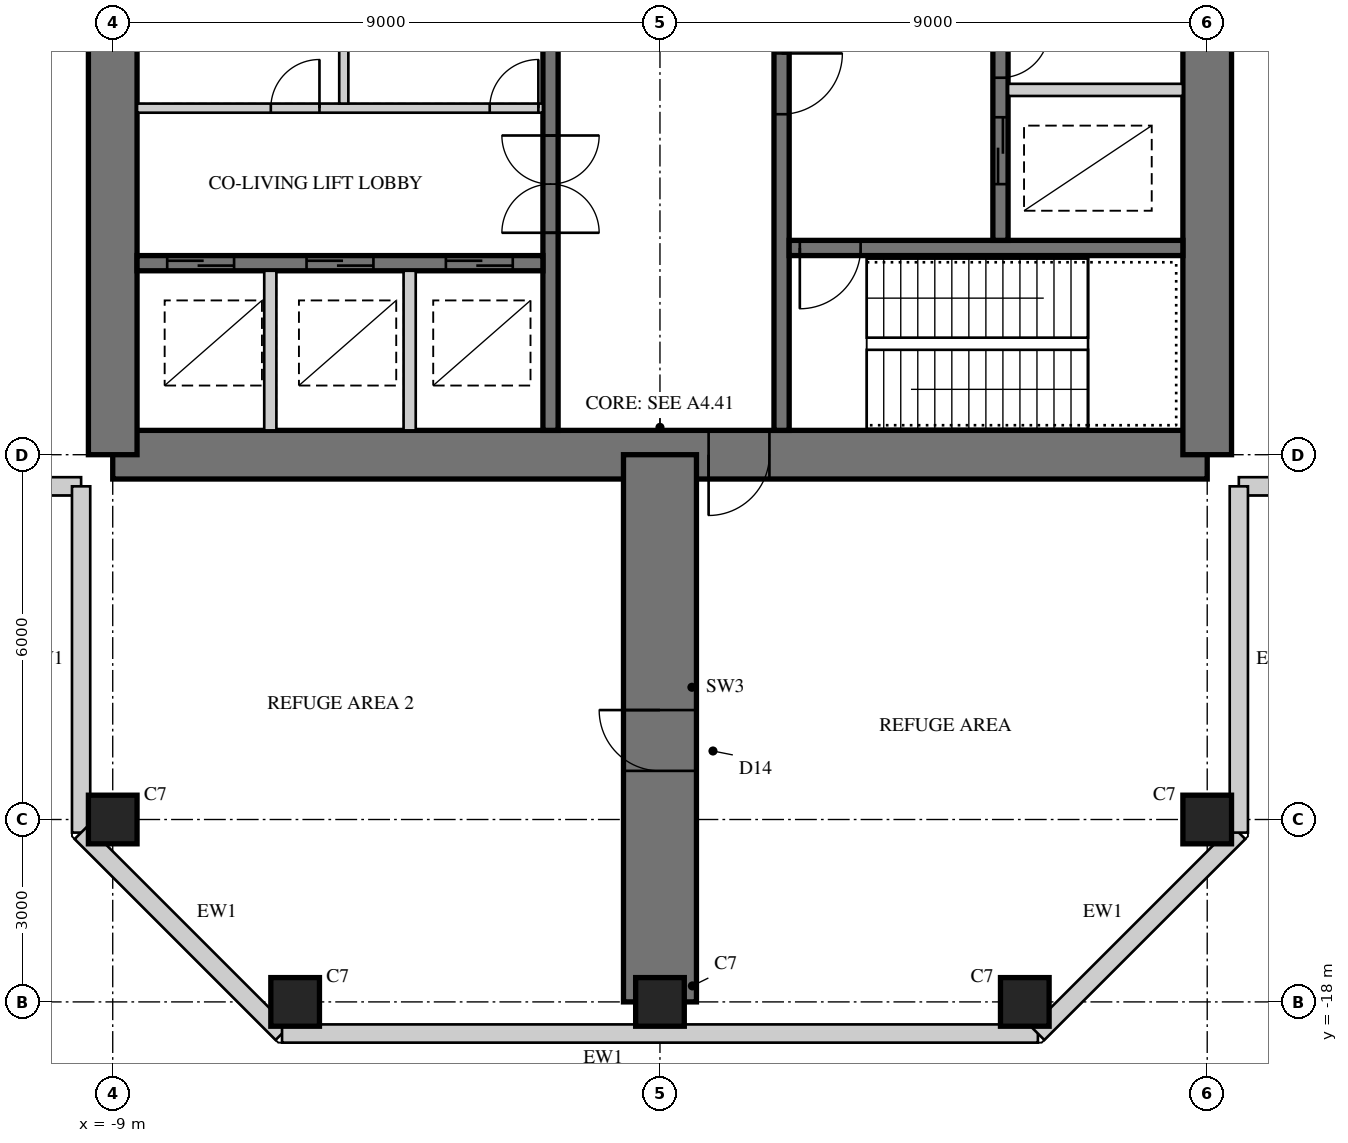
"""IFC4 building model, lengths in metres.
Left out: names, types, materials, properties, quantities, classifications, styles, units other than length and angle.
Written with IfcOpenShell. Run it as: python <this file> out.ifc"""

import sys

from ifc_helpers import new_model, si_unit, direction, frame, frame_2d, origin, origin_2d, place, context, subcontext, project, spatial, rectangle, extrude, element, fill, save


model = new_model("IFC4")
c1 = context("Model", 3, precision=1e-05, world=origin(), true_north=direction((0.0, 1.0)))
c2 = subcontext(c1, "Body", "Model", "MODEL_VIEW")
j1 = project(units=[si_unit("LENGTHUNIT", "METRE"), si_unit("PLANEANGLEUNIT", "RADIAN")], contexts=[c1])
p1 = place(None, origin())
s1 = spatial("IfcSite", under=j1, at=p1, CompositionType="ELEMENT")
p2 = place(p1, origin())
s2 = spatial("IfcBuilding", under=s1, at=p2, CompositionType="ELEMENT")
p3 = place(p2, frame((0.0, 0.0, 252.7)))
s3 = spatial("IfcBuildingStorey", under=s2, at=p3, CompositionType="ELEMENT", Elevation=252.7)
p4 = place(p3, frame((-9.0, -9.0, 0.0), z_axis=(0.0, 0.0, 1.0), x_axis=(1.0, 0.0, 0.0)))
e1 = element("IfcWall", 1, at=p4, inside=s3, PredefinedType="SHEAR", context=c2, shape_type="SweptSolid", body=[
    extrude(rectangle(XDim=18.0, YDim=0.8, at=frame_2d((9.0, 0.0))), origin(), (0.0, 0.0, 1.0), 5.0),
])
p5 = place(p4, frame((9.8, 0.0, 0.0)))
e2 = element("IfcOpeningElement", 2, at=p5, cuts=e1, PredefinedType="OPENING", context=c2, shape_type="SweptSolid", body=[
    extrude(rectangle(XDim=1.0, YDim=2.4, at=frame_2d((0.5, 1.2))), frame((0.0, 0.41, 0.0), z_axis=(0.0, -1.0, 0.0), x_axis=(1.0, 0.0, 0.0)), (0.0, 0.0, 1.0), 0.82),
])
p6 = place(p3, frame((9.0, -9.0, 0.0), z_axis=(0.0, 0.0, 1.0), x_axis=(0.0, 1.0, 0.0)))
e3 = element("IfcWall", 3, at=p6, inside=s3, PredefinedType="SHEAR", context=c2, shape_type="SweptSolid", body=[
    extrude(rectangle(XDim=18.0, YDim=0.8, at=frame_2d((9.0, 0.0))), origin(), (0.0, 0.0, 1.0), 5.0),
])
p7 = place(p6, frame((9.8, 0.0, 0.0)))
e4 = element("IfcOpeningElement", 4, at=p7, cuts=e3, PredefinedType="OPENING", context=c2, shape_type="SweptSolid", body=[
    extrude(rectangle(XDim=1.0, YDim=2.4, at=frame_2d((0.5, 1.2))), frame((0.0, 0.41, 0.0), z_axis=(0.0, -1.0, 0.0), x_axis=(1.0, 0.0, 0.0)), (0.0, 0.0, 1.0), 0.82),
])
p8 = place(p3, frame((-9.0, 9.0, 0.0), z_axis=(0.0, 0.0, 1.0), x_axis=(0.0, -1.0, 0.0)))
e5 = element("IfcWall", 5, at=p8, inside=s3, PredefinedType="SHEAR", context=c2, shape_type="SweptSolid", body=[
    extrude(rectangle(XDim=18.0, YDim=0.8, at=frame_2d((9.0, 0.0))), origin(), (0.0, 0.0, 1.0), 5.0),
])
p9 = place(p8, frame((9.8, 0.0, 0.0)))
e6 = element("IfcOpeningElement", 6, at=p9, cuts=e5, PredefinedType="OPENING", context=c2, shape_type="SweptSolid", body=[
    extrude(rectangle(XDim=1.0, YDim=2.4, at=frame_2d((0.5, 1.2))), frame((0.0, 0.41, 0.0), z_axis=(0.0, -1.0, 0.0), x_axis=(1.0, 0.0, 0.0)), (0.0, 0.0, 1.0), 0.82),
])
p10 = place(p3, frame((-1.8, -1.875, 0.0), z_axis=(0.0, 0.0, 1.0), x_axis=(0.0, -1.0, 0.0)))
e7 = element("IfcWall", 7, at=p10, inside=s3, PredefinedType="SHEAR", context=c2, shape_type="SweptSolid", body=[
    extrude(rectangle(XDim=6.725, YDim=0.25, at=frame_2d((3.363, 0.0))), origin(), (0.0, 0.0, 1.0), 5.0),
])
p11 = place(p10, frame((1.875, 0.0, 0.0)))
e8 = element("IfcOpeningElement", 8, at=p11, cuts=e7, PredefinedType="OPENING", context=c2, shape_type="SweptSolid", body=[
    extrude(rectangle(XDim=1.6, YDim=2.4, at=frame_2d((0.8, 1.2))), frame((0.0, 0.135, 0.0), z_axis=(0.0, -1.0, 0.0), x_axis=(1.0, 0.0, 0.0)), (0.0, 0.0, 1.0), 0.27),
])
p12 = place(p3, frame((-1.925, -5.85, 0.0), z_axis=(0.0, 0.0, 1.0), x_axis=(-1.0, 0.0, 0.0)))
e9 = element("IfcWall", 9, at=p12, inside=s3, PredefinedType="SHEAR", context=c2, shape_type="SweptSolid", body=[
    extrude(rectangle(XDim=6.675, YDim=0.25, at=frame_2d((3.337, 0.0))), origin(), (0.0, 0.0, 1.0), 5.0),
])
p13 = place(p12, frame((0.496, 0.0, 0.0)))
e10 = element("IfcOpeningElement", 10, at=p13, cuts=e9, PredefinedType="OPENING", context=c2, shape_type="SweptSolid", body=[
    extrude(rectangle(XDim=1.1, YDim=2.2, at=frame_2d((0.55, 1.1))), frame((0.0, 0.135, 0.0), z_axis=(0.0, -1.0, 0.0), x_axis=(1.0, 0.0, 0.0)), (0.0, 0.0, 1.0), 0.27),
])
p14 = place(p12, frame((2.788, 0.0, 0.0)))
e11 = element("IfcOpeningElement", 11, at=p14, cuts=e9, PredefinedType="OPENING", context=c2, shape_type="SweptSolid", body=[
    extrude(rectangle(XDim=1.1, YDim=2.2, at=frame_2d((0.55, 1.1))), frame((0.0, 0.135, 0.0), z_axis=(0.0, -1.0, 0.0), x_axis=(1.0, 0.0, 0.0)), (0.0, 0.0, 1.0), 0.27),
])
p15 = place(p12, frame((5.079, 0.0, 0.0)))
e12 = element("IfcOpeningElement", 12, at=p15, cuts=e9, PredefinedType="OPENING", context=c2, shape_type="SweptSolid", body=[
    extrude(rectangle(XDim=1.1, YDim=2.2, at=frame_2d((0.55, 1.1))), frame((0.0, 0.135, 0.0), z_axis=(0.0, -1.0, 0.0), x_axis=(1.0, 0.0, 0.0)), (0.0, 0.0, 1.0), 0.27),
])
p16 = place(p3, frame((-1.925, -3.3, 0.0), z_axis=(0.0, 0.0, 1.0), x_axis=(-1.0, 0.0, 0.0)))
e13 = element("IfcWall", 13, at=p16, inside=s3, PredefinedType="PARTITIONING", context=c2, shape_type="SweptSolid", body=[
    extrude(rectangle(XDim=6.675, YDim=0.15, at=frame_2d((3.337, 0.0))), origin(), (0.0, 0.0, 1.0), 5.0),
])
p17 = place(p16, frame((0.075, 0.0, 0.0)))
e14 = element("IfcOpeningElement", 14, at=p17, cuts=e13, PredefinedType="OPENING", context=c2, shape_type="SweptSolid", body=[
    extrude(rectangle(XDim=0.8, YDim=2.1, at=frame_2d((0.4, 1.05))), frame((0.0, 0.085, 0.0), z_axis=(0.0, -1.0, 0.0), x_axis=(1.0, 0.0, 0.0)), (0.0, 0.0, 1.0), 0.17),
])
p18 = place(p16, frame((3.675, 0.0, 0.0)))
e15 = element("IfcOpeningElement", 15, at=p18, cuts=e13, PredefinedType="OPENING", context=c2, shape_type="SweptSolid", body=[
    extrude(rectangle(XDim=0.8, YDim=2.1, at=frame_2d((0.4, 1.05))), frame((0.0, 0.085, 0.0), z_axis=(0.0, -1.0, 0.0), x_axis=(1.0, 0.0, 0.0)), (0.0, 0.0, 1.0), 0.17),
])
p19 = place(p3, frame((-5.2, -2.125, 0.0), z_axis=(0.0, 0.0, 1.0), x_axis=(0.0, -1.0, 0.0)))
e16 = element("IfcWall", 16, at=p19, inside=s3, PredefinedType="PARTITIONING", context=c2, shape_type="SweptSolid", body=[
    extrude(rectangle(XDim=1.1, YDim=0.15, at=frame_2d((0.55, 0.0))), origin(), (0.0, 0.0, 1.0), 5.0),
])
for number, where, z_axis, x_axis in (
    (17, (-4.117, -5.975, 0.0), (0.0, 0.0, 1.0), (0.0, -1.0, 0.0)),
    (18, (-6.408, -5.975, 0.0), (0.0, 0.0, 1.0), (0.0, -1.0, 0.0)),
):
    element("IfcWall", number, at=place(p3, frame(where, z_axis=z_axis, x_axis=x_axis)), inside=s3, PredefinedType="PARTITIONING", context=c2, shape_type="SweptSolid", body=[
        extrude(rectangle(XDim=2.625, YDim=0.2, at=frame_2d((1.312, 0.0))), origin(), (0.0, 0.0, 1.0), 5.0),
    ])
p20 = place(p3, frame((2.0, -1.675, 0.0), z_axis=(0.0, 0.0, 1.0), x_axis=(0.0, -1.0, 0.0)))
e19 = element("IfcWall", 19, at=p20, inside=s3, PredefinedType="SHEAR", context=c2, shape_type="SweptSolid", body=[
    extrude(rectangle(XDim=6.925, YDim=0.25, at=frame_2d((3.462, 0.0))), origin(), (0.0, 0.0, 1.0), 5.0),
])
p21 = place(p20, frame((0.725, 0.0, 0.0)))
e20 = element("IfcOpeningElement", 20, at=p21, cuts=e19, PredefinedType="OPENING", context=c2, shape_type="SweptSolid", body=[
    extrude(rectangle(XDim=1.0, YDim=2.1, at=frame_2d((0.5, 1.05))), frame((0.0, 0.135, 0.0), z_axis=(0.0, -1.0, 0.0), x_axis=(1.0, 0.0, 0.0)), (0.0, 0.0, 1.0), 0.27),
])
p22 = place(p3, frame((2.125, -5.6, 0.0), z_axis=(0.0, 0.0, 1.0), x_axis=(1.0, 0.0, 0.0)))
e21 = element("IfcWall", 21, at=p22, inside=s3, PredefinedType="SHEAR", context=c2, shape_type="SweptSolid", body=[
    extrude(rectangle(XDim=6.475, YDim=0.25, at=frame_2d((3.238, 0.0))), origin(), (0.0, 0.0, 1.0), 5.0),
])
p23 = place(p22, frame((0.175, 0.0, 0.0)))
e22 = element("IfcOpeningElement", 22, at=p23, cuts=e21, PredefinedType="OPENING", context=c2, shape_type="SweptSolid", body=[
    extrude(rectangle(XDim=1.0, YDim=2.1, at=frame_2d((0.5, 1.05))), frame((0.0, 0.135, 0.0), z_axis=(0.0, -1.0, 0.0), x_axis=(1.0, 0.0, 0.0)), (0.0, 0.0, 1.0), 0.27),
])
p24 = place(p3, frame((5.6, -1.925, 0.0), z_axis=(0.0, 0.0, 1.0), x_axis=(0.0, -1.0, 0.0)))
e23 = element("IfcWall", 23, at=p24, inside=s3, PredefinedType="SHEAR", context=c2, shape_type="SweptSolid", body=[
    extrude(rectangle(XDim=3.55, YDim=0.25, at=frame_2d((1.775, 0.0))), origin(), (0.0, 0.0, 1.0), 5.0),
])
p25 = place(p24, frame((1.525, 0.0, 0.0)))
e24 = element("IfcOpeningElement", 24, at=p25, cuts=e23, PredefinedType="OPENING", context=c2, shape_type="SweptSolid", body=[
    extrude(rectangle(XDim=1.1, YDim=2.2, at=frame_2d((0.55, 1.1))), frame((0.0, 0.135, 0.0), z_axis=(0.0, -1.0, 0.0), x_axis=(1.0, 0.0, 0.0)), (0.0, 0.0, 1.0), 0.27),
])
p26 = place(p24, frame((0.075, 0.0, 0.0)))
e25 = element("IfcOpeningElement", 25, at=p26, cuts=e23, PredefinedType="OPENING", context=c2, shape_type="SweptSolid", body=[
    extrude(rectangle(XDim=0.8, YDim=2.1, at=frame_2d((0.4, 1.05))), frame((0.0, 0.135, 0.0), z_axis=(0.0, -1.0, 0.0), x_axis=(1.0, 0.0, 0.0)), (0.0, 0.0, 1.0), 0.27),
])
p27 = place(p3, frame((5.725, -3.0, 0.0), z_axis=(0.0, 0.0, 1.0), x_axis=(1.0, 0.0, 0.0)))
e26 = element("IfcWall", 26, at=p27, inside=s3, PredefinedType="PARTITIONING", context=c2, shape_type="SweptSolid", body=[
    extrude(rectangle(XDim=2.875, YDim=0.2, at=frame_2d((1.438, 0.0))), origin(), (0.0, 0.0, 1.0), 5.0),
])
p28 = place(p3, frame((0.0, -9.0, 0.0), z_axis=(0.0, 0.0, 1.0), x_axis=(0.0, -1.0, 0.0)))
e27 = element("IfcWall", 27, at=p28, inside=s3, PredefinedType="SHEAR", context=c2, shape_type="SweptSolid", body=[
    extrude(rectangle(XDim=9.0, YDim=1.2, at=frame_2d((4.5, 0.0))), origin(), (0.0, 0.0, 1.0), 5.0),
])
p29 = place(p28, frame((4.2, 0.0, 0.0)))
e28 = element("IfcOpeningElement", 28, at=p29, cuts=e27, PredefinedType="OPENING", context=c2, shape_type="SweptSolid", body=[
    extrude(rectangle(XDim=1.0, YDim=2.2, at=frame_2d((0.5, 1.1))), frame((0.0, 0.61, 0.0), z_axis=(0.0, -1.0, 0.0), x_axis=(1.0, 0.0, 0.0)), (0.0, 0.0, 1.0), 1.22),
])
for number, where, z_axis, x_axis in (
    (29, (-9.0, -15.0, 0.0), (0.0, 0.0, 1.0), (1.0, 0.0, 0.0)),
    (30, (9.0, -15.0, 0.0), (0.0, 0.0, 1.0), (1.0, 0.0, 0.0)),
    (31, (-6.0, -18.0, 0.0), (0.0, 0.0, 1.0), (1.0, 0.0, 0.0)),
    (32, (0.0, -18.0, 0.0), (0.0, 0.0, 1.0), (1.0, 0.0, 0.0)),
    (33, (6.0, -18.0, 0.0), (0.0, 0.0, 1.0), (1.0, 0.0, 0.0)),
):
    element("IfcColumn", number, at=place(p3, frame(where, z_axis=z_axis, x_axis=x_axis)), inside=s3, PredefinedType="COLUMN", context=c2, shape_type="SweptSolid", body=[
        extrude(rectangle(XDim=0.8, YDim=0.8, at=origin_2d()), origin(), (0.0, 0.0, 1.0), 5.0),
    ])
p30 = place(p3, frame((9.52, -9.52, 0.0), z_axis=(0.0, 0.0, 1.0), x_axis=(1.0, 0.0, 0.0)))
e34 = element("IfcWall", 34, at=p30, inside=s3, PredefinedType="SOLIDWALL", context=c2, shape_type="SweptSolid", body=[
    extrude(rectangle(XDim=5.695, YDim=0.3, at=frame_2d((2.848, 0.0))), origin(), (0.0, 0.0, 1.0), 4.82),
])
p31 = place(p3, frame((-24.215, -9.52, 0.0), z_axis=(0.0, 0.0, 1.0), x_axis=(1.0, 0.0, 0.0)))
e35 = element("IfcWall", 35, at=p31, inside=s3, PredefinedType="SOLIDWALL", context=c2, shape_type="SweptSolid", body=[
    extrude(rectangle(XDim=14.695, YDim=0.3, at=frame_2d((7.348, 0.0))), origin(), (0.0, 0.0, 1.0), 4.82),
])
p32 = place(p3, frame((-9.52, -9.52, 0.0), z_axis=(0.0, 0.0, 1.0), x_axis=(0.0, -1.0, 0.0)))
e36 = element("IfcWall", 36, at=p32, inside=s3, PredefinedType="SOLIDWALL", context=c2, shape_type="SweptSolid", body=[
    extrude(rectangle(XDim=5.695, YDim=0.3, at=frame_2d((2.848, 0.0))), origin(), (0.0, 0.0, 1.0), 4.82),
])
p33 = place(p3, frame((-9.52, -15.215, 0.0), z_axis=(0.0, 0.0, 1.0), x_axis=(0.707106781187, -0.707106781187, 0.0)))
e37 = element("IfcWall", 37, at=p33, inside=s3, PredefinedType="SOLIDWALL", context=c2, shape_type="SweptSolid", body=[
    extrude(rectangle(XDim=4.674, YDim=0.3, at=frame_2d((2.337, 0.0))), origin(), (0.0, 0.0, 1.0), 4.82),
])
p34 = place(p3, frame((-6.215, -18.52, 0.0), z_axis=(0.0, 0.0, 1.0), x_axis=(1.0, 0.0, 0.0)))
e38 = element("IfcWall", 38, at=p34, inside=s3, PredefinedType="SOLIDWALL", context=c2, shape_type="SweptSolid", body=[
    extrude(rectangle(XDim=12.431, YDim=0.3, at=frame_2d((6.215, 0.0))), origin(), (0.0, 0.0, 1.0), 4.82),
])
p35 = place(p3, frame((6.215, -18.52, 0.0), z_axis=(0.0, 0.0, 1.0), x_axis=(0.707106781187, 0.707106781187, 0.0)))
e39 = element("IfcWall", 39, at=p35, inside=s3, PredefinedType="SOLIDWALL", context=c2, shape_type="SweptSolid", body=[
    extrude(rectangle(XDim=4.674, YDim=0.3, at=frame_2d((2.337, 0.0))), origin(), (0.0, 0.0, 1.0), 4.82),
])
p36 = place(p3, frame((9.52, -15.215, 0.0), z_axis=(0.0, 0.0, 1.0), x_axis=(0.0, 1.0, 0.0)))
e40 = element("IfcWall", 40, at=p36, inside=s3, PredefinedType="SOLIDWALL", context=c2, shape_type="SweptSolid", body=[
    extrude(rectangle(XDim=5.695, YDim=0.3, at=frame_2d((2.848, 0.0))), origin(), (0.0, 0.0, 1.0), 4.82),
])
p37 = place(p29, frame((1.0, 0.0, 0.0), z_axis=(0.0, 0.0, 1.0), x_axis=(-1.0, 0.0, 0.0)))
e41 = element("IfcDoor", 41, at=p37, inside=s3, OperationType="SINGLE_SWING_RIGHT", PredefinedType="DOOR", context=c2, shape_type="SweptSolid", body=[
    extrude(rectangle(XDim=1.0, YDim=2.2, at=frame_2d((0.5, 1.1))), frame((0.0, 0.025, 0.0), z_axis=(0.0, -1.0, 0.0), x_axis=(1.0, 0.0, 0.0)), (0.0, 0.0, 1.0), 0.05),
])
fill(e28, e41)
p38 = place(p5, frame((1.0, 0.0, 0.0), z_axis=(0.0, 0.0, 1.0), x_axis=(-1.0, 0.0, 0.0)))
e42 = element("IfcDoor", 42, at=p38, inside=s3, OperationType="SINGLE_SWING_RIGHT", PredefinedType="DOOR", context=c2, shape_type="SweptSolid", body=[
    extrude(rectangle(XDim=1.0, YDim=2.4, at=frame_2d((0.5, 1.2))), frame((0.0, -0.005, 0.0), z_axis=(0.0, -1.0, 0.0), x_axis=(1.0, 0.0, 0.0)), (0.0, 0.0, 1.0), 0.05),
])
fill(e2, e42)
p39 = place(p13, origin())
e43 = element("IfcDoor", 43, at=p39, inside=s3, OperationType="DOUBLE_DOOR_SLIDING", PredefinedType="DOOR", context=c2, shape_type="SweptSolid", body=[
    extrude(rectangle(XDim=1.1, YDim=2.2, at=frame_2d((0.55, 1.1))), frame((0.0, 0.025, 0.0), z_axis=(0.0, -1.0, 0.0), x_axis=(1.0, 0.0, 0.0)), (0.0, 0.0, 1.0), 0.05),
])
fill(e10, e43)
p40 = place(p14, origin())
e44 = element("IfcDoor", 44, at=p40, inside=s3, OperationType="DOUBLE_DOOR_SLIDING", PredefinedType="DOOR", context=c2, shape_type="SweptSolid", body=[
    extrude(rectangle(XDim=1.1, YDim=2.2, at=frame_2d((0.55, 1.1))), frame((0.0, 0.025, 0.0), z_axis=(0.0, -1.0, 0.0), x_axis=(1.0, 0.0, 0.0)), (0.0, 0.0, 1.0), 0.05),
])
fill(e11, e44)
p41 = place(p15, origin())
e45 = element("IfcDoor", 45, at=p41, inside=s3, OperationType="DOUBLE_DOOR_SLIDING", PredefinedType="DOOR", context=c2, shape_type="SweptSolid", body=[
    extrude(rectangle(XDim=1.1, YDim=2.2, at=frame_2d((0.55, 1.1))), frame((0.0, 0.025, 0.0), z_axis=(0.0, -1.0, 0.0), x_axis=(1.0, 0.0, 0.0)), (0.0, 0.0, 1.0), 0.05),
])
fill(e12, e45)
p42 = place(p11, origin())
e46 = element("IfcDoor", 46, at=p42, inside=s3, OperationType="DOUBLE_DOOR_DOUBLE_SWING", PredefinedType="DOOR", context=c2, shape_type="SweptSolid", body=[
    extrude(rectangle(XDim=1.6, YDim=2.4, at=frame_2d((0.8, 1.2))), frame((0.0, 0.025, 0.0), z_axis=(0.0, -1.0, 0.0), x_axis=(1.0, 0.0, 0.0)), (0.0, 0.0, 1.0), 0.05),
])
fill(e8, e46)
p43 = place(p17, frame((0.8, 0.0, 0.0), z_axis=(0.0, 0.0, 1.0), x_axis=(-1.0, 0.0, 0.0)))
e47 = element("IfcDoor", 47, at=p43, inside=s3, OperationType="SINGLE_SWING_RIGHT", PredefinedType="DOOR", context=c2, shape_type="SweptSolid", body=[
    extrude(rectangle(XDim=0.8, YDim=2.1, at=frame_2d((0.4, 1.05))), frame((0.0, 0.025, 0.0), z_axis=(0.0, -1.0, 0.0), x_axis=(1.0, 0.0, 0.0)), (0.0, 0.0, 1.0), 0.05),
])
fill(e14, e47)
p44 = place(p18, frame((0.8, 0.0, 0.0), z_axis=(0.0, 0.0, 1.0), x_axis=(-1.0, 0.0, 0.0)))
e48 = element("IfcDoor", 48, at=p44, inside=s3, OperationType="SINGLE_SWING_RIGHT", PredefinedType="DOOR", context=c2, shape_type="SweptSolid", body=[
    extrude(rectangle(XDim=0.8, YDim=2.1, at=frame_2d((0.4, 1.05))), frame((0.0, 0.025, 0.0), z_axis=(0.0, -1.0, 0.0), x_axis=(1.0, 0.0, 0.0)), (0.0, 0.0, 1.0), 0.05),
])
fill(e15, e48)
p45 = place(p21, origin())
e49 = element("IfcDoor", 49, at=p45, inside=s3, OperationType="SINGLE_SWING_LEFT", PredefinedType="DOOR", context=c2, shape_type="SweptSolid", body=[
    extrude(rectangle(XDim=1.0, YDim=2.1, at=frame_2d((0.5, 1.05))), frame((0.0, 0.025, 0.0), z_axis=(0.0, -1.0, 0.0), x_axis=(1.0, 0.0, 0.0)), (0.0, 0.0, 1.0), 0.05),
])
fill(e20, e49)
p46 = place(p23, frame((1.0, 0.0, 0.0), z_axis=(0.0, 0.0, 1.0), x_axis=(-1.0, 0.0, 0.0)))
e50 = element("IfcDoor", 50, at=p46, inside=s3, OperationType="SINGLE_SWING_RIGHT", PredefinedType="DOOR", context=c2, shape_type="SweptSolid", body=[
    extrude(rectangle(XDim=1.0, YDim=2.1, at=frame_2d((0.5, 1.05))), frame((0.0, 0.025, 0.0), z_axis=(0.0, -1.0, 0.0), x_axis=(1.0, 0.0, 0.0)), (0.0, 0.0, 1.0), 0.05),
])
fill(e22, e50)
p47 = place(p25, origin())
e51 = element("IfcDoor", 51, at=p47, inside=s3, OperationType="DOUBLE_DOOR_SLIDING", PredefinedType="DOOR", context=c2, shape_type="SweptSolid", body=[
    extrude(rectangle(XDim=1.1, YDim=2.2, at=frame_2d((0.55, 1.1))), frame((0.0, 0.025, 0.0), z_axis=(0.0, -1.0, 0.0), x_axis=(1.0, 0.0, 0.0)), (0.0, 0.0, 1.0), 0.05),
])
fill(e24, e51)
p48 = place(p26, origin())
e52 = element("IfcDoor", 52, at=p48, inside=s3, OperationType="SINGLE_SWING_LEFT", PredefinedType="DOOR", context=c2, shape_type="SweptSolid", body=[
    extrude(rectangle(XDim=0.8, YDim=2.1, at=frame_2d((0.4, 1.05))), frame((0.0, 0.025, 0.0), z_axis=(0.0, -1.0, 0.0), x_axis=(1.0, 0.0, 0.0)), (0.0, 0.0, 1.0), 0.05),
])
fill(e25, e52)
save(model, sys.argv[1])
